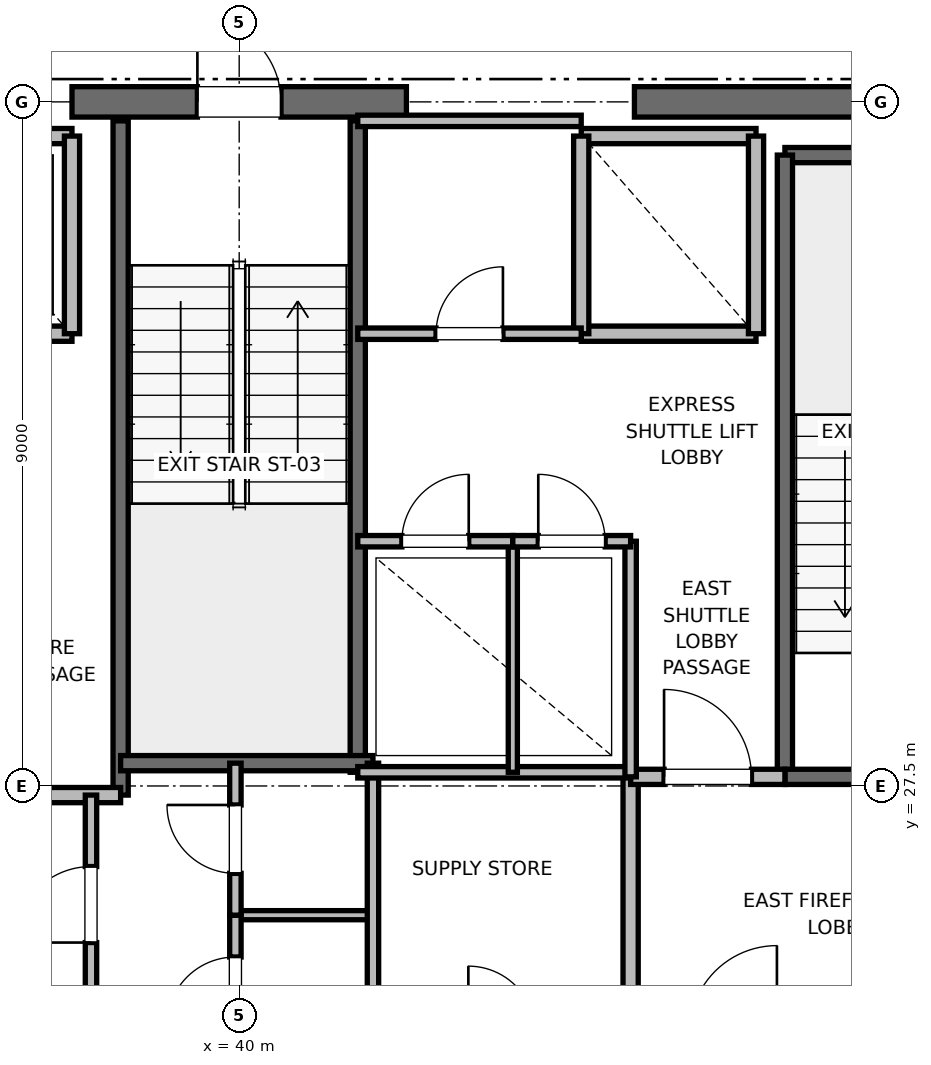
"""IFC4 building model, lengths in metres.
Left out: names, types, materials, properties, quantities, classifications, styles, units other than length and angle.
Written with IfcOpenShell. Run it as: python <this file> out.ifc"""

import sys

from ifc_helpers import new_model, si_unit, direction, frame, frame_2d, origin, place, context, subcontext, project, spatial, rectangle, extrude, element, fill, save


model = new_model("IFC4")
c1 = context("Model", 3, precision=1e-05, world=origin(), true_north=direction((0.0, 1.0)))
c2 = subcontext(c1, "Body", "Model", "MODEL_VIEW")
j1 = project(units=[si_unit("LENGTHUNIT", "METRE"), si_unit("PLANEANGLEUNIT", "RADIAN")], contexts=[c1])
p1 = place(None, origin())
s1 = spatial("IfcSite", under=j1, at=p1, CompositionType="ELEMENT")
p2 = place(p1, origin())
s2 = spatial("IfcBuilding", under=s1, at=p2, CompositionType="ELEMENT")
p3 = place(p2, frame((0.0, 0.0, 330.8)))
s3 = spatial("IfcBuildingStorey", under=s2, at=p3, CompositionType="ELEMENT", Elevation=330.8)
p4 = place(p3, frame((37.8, 36.5, 0.0), z_axis=(0.0, 0.0, 1.0), x_axis=(1.0, 0.0, 0.0)))
e1 = element("IfcWall", 1, at=p4, inside=s3, PredefinedType="SHEAR", context=c2, shape_type="SweptSolid", body=[
    extrude(rectangle(XDim=4.4, YDim=0.4, at=frame_2d((2.2, 0.0))), origin(), (0.0, 0.0, 1.0), 3.785),
])
p5 = place(p4, frame((1.65, 0.0, 0.0)))
e2 = element("IfcOpeningElement", 2, at=p5, cuts=e1, PredefinedType="OPENING", context=c2, shape_type="SweptSolid", body=[
    extrude(rectangle(XDim=1.1, YDim=2.15, at=frame_2d((0.55, 1.075))), frame((0.0, 0.2, 0.0), z_axis=(0.0, -1.0, 0.0), x_axis=(1.0, 0.0, 0.0)), (0.0, 0.0, 1.0), 0.4),
])
p6 = place(p3, frame((45.2, 36.5, 0.0), z_axis=(0.0, 0.0, 1.0), x_axis=(1.0, 0.0, 0.0)))
e3 = element("IfcWall", 3, at=p6, inside=s3, PredefinedType="SHEAR", context=c2, shape_type="SweptSolid", body=[
    extrude(rectangle(XDim=5.8, YDim=0.4, at=frame_2d((2.9, 0.0))), origin(), (0.0, 0.0, 1.0), 3.785),
])
p7 = place(p3, frame((47.18, 35.8, 0.0), z_axis=(0.0, 0.0, 1.0), x_axis=(1.0, 0.0, 0.0)))
e4 = element("IfcWall", 4, at=p7, inside=s3, PredefinedType="SOLIDWALL", context=c2, shape_type="SweptSolid", body=[
    extrude(rectangle(XDim=3.12, YDim=0.2, at=frame_2d((1.56, 0.0))), origin(), (0.0, 0.0, 1.0), 3.785),
])
p8 = place(p3, frame((47.18, 27.62, 0.0), z_axis=(0.0, 0.0, 1.0), x_axis=(0.0, 1.0, 0.0)))
e5 = element("IfcWall", 5, at=p8, inside=s3, PredefinedType="SOLIDWALL", context=c2, shape_type="SweptSolid", body=[
    extrude(rectangle(XDim=8.18, YDim=0.2, at=frame_2d((4.09, 0.0))), origin(), (0.0, 0.0, 1.0), 3.785),
])
p9 = place(p3, frame((47.18, 27.62, 0.0), z_axis=(0.0, 0.0, 1.0), x_axis=(1.0, 0.0, 0.0)))
e6 = element("IfcWall", 6, at=p9, inside=s3, PredefinedType="SOLIDWALL", context=c2, shape_type="SweptSolid", body=[
    extrude(rectangle(XDim=3.12, YDim=0.2, at=frame_2d((1.56, 0.0))), origin(), (0.0, 0.0, 1.0), 3.785),
])
p10 = place(p9, frame((1.01, 0.0, 0.0)))
e7 = element("IfcOpeningElement", 7, at=p10, cuts=e6, PredefinedType="OPENING", context=c2, shape_type="SweptSolid", body=[
    extrude(rectangle(XDim=1.1, YDim=2.15, at=frame_2d((0.55, 1.075))), frame((0.0, 0.1, 0.0), z_axis=(0.0, -1.0, 0.0), x_axis=(1.0, 0.0, 0.0)), (0.0, 0.0, 1.0), 0.2),
])
p11 = place(p3, frame((38.44, 27.38, 0.0), z_axis=(0.0, 0.0, 1.0), x_axis=(0.0, 1.0, 0.0)))
e8 = element("IfcWall", 8, at=p11, inside=s3, PredefinedType="SOLIDWALL", context=c2, shape_type="SweptSolid", body=[
    extrude(rectangle(XDim=8.87, YDim=0.2, at=frame_2d((4.435, 0.0))), origin(), (0.0, 0.0, 1.0), 3.785),
])
p12 = place(p3, frame((41.56, 27.68, 0.0), z_axis=(0.0, 0.0, 1.0), x_axis=(0.0, 1.0, 0.0)))
e9 = element("IfcWall", 9, at=p12, inside=s3, PredefinedType="SOLIDWALL", context=c2, shape_type="SweptSolid", body=[
    extrude(rectangle(XDim=8.57, YDim=0.2, at=frame_2d((4.285, 0.0))), origin(), (0.0, 0.0, 1.0), 3.785),
])
p13 = place(p3, frame((38.44, 27.8, 0.0), z_axis=(0.0, 0.0, 1.0), x_axis=(1.0, 0.0, 0.0)))
e10 = element("IfcWall", 10, at=p13, inside=s3, PredefinedType="SOLIDWALL", context=c2, shape_type="SweptSolid", body=[
    extrude(rectangle(XDim=3.32, YDim=0.2, at=frame_2d((1.66, 0.0))), origin(), (0.0, 0.0, 1.0), 3.785),
])
p14 = place(p3, frame((32.82, 27.38, 0.0), z_axis=(0.0, 0.0, 1.0), x_axis=(1.0, 0.0, 0.0)))
e11 = element("IfcWall", 11, at=p14, inside=s3, PredefinedType="PARTITIONING", context=c2, shape_type="SweptSolid", body=[
    extrude(rectangle(XDim=5.62, YDim=0.2, at=frame_2d((2.81, 0.0))), origin(), (0.0, 0.0, 1.0), 3.785),
])
p15 = place(p3, frame((45.15, 24.25, 0.0), z_axis=(0.0, 0.0, 1.0), x_axis=(0.0, 1.0, 0.0)))
e12 = element("IfcWall", 12, at=p15, inside=s3, PredefinedType="PARTITIONING", context=c2, shape_type="SweptSolid", body=[
    extrude(rectangle(XDim=3.37, YDim=0.2, at=frame_2d((1.685, 0.0))), origin(), (0.0, 0.0, 1.0), 3.785),
])
p16 = place(p3, frame((45.15, 27.62, 0.0), z_axis=(0.0, 0.0, 1.0), x_axis=(1.0, 0.0, 0.0)))
e13 = element("IfcWall", 13, at=p16, inside=s3, PredefinedType="PARTITIONING", context=c2, shape_type="SweptSolid", body=[
    extrude(rectangle(XDim=2.03, YDim=0.2, at=frame_2d((1.015, 0.0))), origin(), (0.0, 0.0, 1.0), 3.785),
])
p17 = place(p16, frame((0.44, 0.0, 0.0)))
e14 = element("IfcOpeningElement", 14, at=p17, cuts=e13, PredefinedType="OPENING", context=c2, shape_type="SweptSolid", body=[
    extrude(rectangle(XDim=1.15, YDim=2.2, at=frame_2d((0.575, 1.1))), frame((0.0, 0.1, 0.0), z_axis=(0.0, -1.0, 0.0), x_axis=(1.0, 0.0, 0.0)), (0.0, 0.0, 1.0), 0.2),
])
p18 = place(p3, frame((35.5, 33.45, 0.0), z_axis=(0.0, 0.0, 1.0), x_axis=(1.0, 0.0, 0.0)))
e15 = element("IfcWall", 15, at=p18, inside=s3, PredefinedType="SOLIDWALL", context=c2, shape_type="SweptSolid", body=[
    extrude(rectangle(XDim=2.3, YDim=0.2, at=frame_2d((1.15, 0.0))), origin(), (0.0, 0.0, 1.0), 3.785),
])
p19 = place(p18, frame((0.6, 0.0, 0.0)))
e16 = element("IfcOpeningElement", 16, at=p19, cuts=e15, PredefinedType="OPENING", context=c2, shape_type="SweptSolid", body=[
    extrude(rectangle(XDim=1.1, YDim=2.2, at=frame_2d((0.55, 1.1))), frame((0.0, 0.1, 0.0), z_axis=(0.0, -1.0, 0.0), x_axis=(1.0, 0.0, 0.0)), (0.0, 0.0, 1.0), 0.2),
])
p20 = place(p3, frame((37.8, 36.05, 0.0), z_axis=(0.0, 0.0, 1.0), x_axis=(-1.0, 0.0, 0.0)))
e17 = element("IfcWall", 17, at=p20, inside=s3, PredefinedType="SOLIDWALL", context=c2, shape_type="SweptSolid", body=[
    extrude(rectangle(XDim=2.3, YDim=0.2, at=frame_2d((1.15, 0.0))), origin(), (0.0, 0.0, 1.0), 2.865),
])
p21 = place(p3, frame((37.8, 33.45, 0.0), z_axis=(0.0, 0.0, 1.0), x_axis=(0.0, 1.0, 0.0)))
e18 = element("IfcWall", 18, at=p21, inside=s3, PredefinedType="SOLIDWALL", context=c2, shape_type="SweptSolid", body=[
    extrude(rectangle(XDim=2.6, YDim=0.2, at=frame_2d((1.3, 0.0))), origin(), (0.0, 0.0, 1.0), 2.865),
])
p22 = place(p3, frame((44.5, 33.45, 0.0), z_axis=(0.0, 0.0, 1.0), x_axis=(1.0, 0.0, 0.0)))
e19 = element("IfcWall", 19, at=p22, inside=s3, PredefinedType="SOLIDWALL", context=c2, shape_type="SweptSolid", body=[
    extrude(rectangle(XDim=2.3, YDim=0.2, at=frame_2d((1.15, 0.0))), origin(), (0.0, 0.0, 1.0), 3.785),
])
p23 = place(p3, frame((46.8, 36.05, 0.0), z_axis=(0.0, 0.0, 1.0), x_axis=(-1.0, 0.0, 0.0)))
e20 = element("IfcWall", 20, at=p23, inside=s3, PredefinedType="SOLIDWALL", context=c2, shape_type="SweptSolid", body=[
    extrude(rectangle(XDim=2.3, YDim=0.2, at=frame_2d((1.15, 0.0))), origin(), (0.0, 0.0, 1.0), 2.865),
])
p24 = place(p3, frame((44.5, 36.05, 0.0), z_axis=(0.0, 0.0, 1.0), x_axis=(0.0, -1.0, 0.0)))
e21 = element("IfcWall", 21, at=p24, inside=s3, PredefinedType="SOLIDWALL", context=c2, shape_type="SweptSolid", body=[
    extrude(rectangle(XDim=2.6, YDim=0.2, at=frame_2d((1.3, 0.0))), origin(), (0.0, 0.0, 1.0), 2.865),
])
p25 = place(p3, frame((46.8, 33.45, 0.0), z_axis=(0.0, 0.0, 1.0), x_axis=(0.0, 1.0, 0.0)))
e22 = element("IfcWall", 22, at=p25, inside=s3, PredefinedType="SOLIDWALL", context=c2, shape_type="SweptSolid", body=[
    extrude(rectangle(XDim=2.6, YDim=0.2, at=frame_2d((1.3, 0.0))), origin(), (0.0, 0.0, 1.0), 3.785),
])
p26 = place(p3, frame((39.95, 25.8, 0.0), z_axis=(0.0, 0.0, 1.0), x_axis=(1.0, 0.0, 0.0)))
e23 = element("IfcWall", 23, at=p26, inside=s3, PredefinedType="PARTITIONING", context=c2, shape_type="SweptSolid", body=[
    extrude(rectangle(XDim=1.81, YDim=0.12, at=frame_2d((0.905, 0.0))), origin(), (0.0, 0.0, 1.0), 2.85),
])
p27 = place(p3, frame((41.76, 23.8, 0.0), z_axis=(0.0, 0.0, 1.0), x_axis=(0.0, 1.0, 0.0)))
e24 = element("IfcWall", 24, at=p27, inside=s3, PredefinedType="PARTITIONING", context=c2, shape_type="SweptSolid", body=[
    extrude(rectangle(XDim=4.0, YDim=0.15, at=frame_2d((2.0, 0.0))), origin(), (0.0, 0.0, 1.0), 2.85),
])
p28 = place(p3, frame((39.95, 23.8, 0.0), z_axis=(0.0, 0.0, 1.0), x_axis=(0.0, 1.0, 0.0)))
e25 = element("IfcWall", 25, at=p28, inside=s3, PredefinedType="PARTITIONING", context=c2, shape_type="SweptSolid", body=[
    extrude(rectangle(XDim=2.0, YDim=0.15, at=frame_2d((1.0, 0.0))), origin(), (0.0, 0.0, 1.0), 2.85),
])
p29 = place(p28, frame((0.55, 0.0, 0.0)))
e26 = element("IfcOpeningElement", 26, at=p29, cuts=e25, PredefinedType="OPENING", context=c2, shape_type="SweptSolid", body=[
    extrude(rectangle(XDim=0.9, YDim=2.1, at=frame_2d((0.45, 1.05))), frame((0.0, 0.075, 0.0), z_axis=(0.0, -1.0, 0.0), x_axis=(1.0, 0.0, 0.0)), (0.0, 0.0, 1.0), 0.15),
])
p30 = place(p3, frame((39.95, 25.8, 0.0), z_axis=(0.0, 0.0, 1.0), x_axis=(0.0, 1.0, 0.0)))
e27 = element("IfcWall", 27, at=p30, inside=s3, PredefinedType="PARTITIONING", context=c2, shape_type="SweptSolid", body=[
    extrude(rectangle(XDim=2.0, YDim=0.15, at=frame_2d((1.0, 0.0))), origin(), (0.0, 0.0, 1.0), 2.85),
])
p31 = place(p30, frame((0.55, 0.0, 0.0)))
e28 = element("IfcOpeningElement", 28, at=p31, cuts=e27, PredefinedType="OPENING", context=c2, shape_type="SweptSolid", body=[
    extrude(rectangle(XDim=0.9, YDim=2.1, at=frame_2d((0.45, 1.05))), frame((0.0, 0.075, 0.0), z_axis=(0.0, -1.0, 0.0), x_axis=(1.0, 0.0, 0.0)), (0.0, 0.0, 1.0), 0.15),
])
p32 = place(p3, frame((38.05, 24.5, 0.0), z_axis=(0.0, 0.0, 1.0), x_axis=(0.0, 1.0, 0.0)))
e29 = element("IfcWall", 29, at=p32, inside=s3, PredefinedType="PARTITIONING", context=c2, shape_type="SweptSolid", body=[
    extrude(rectangle(XDim=2.88, YDim=0.15, at=frame_2d((1.44, 0.0))), origin(), (0.0, 0.0, 1.0), 2.85),
])
p33 = place(p32, frame((0.94, 0.0, 0.0)))
e30 = element("IfcOpeningElement", 30, at=p33, cuts=e29, PredefinedType="OPENING", context=c2, shape_type="SweptSolid", body=[
    extrude(rectangle(XDim=1.0, YDim=2.15, at=frame_2d((0.5, 1.075))), frame((0.0, 0.075, 0.0), z_axis=(0.0, -1.0, 0.0), x_axis=(1.0, 0.0, 0.0)), (0.0, 0.0, 1.0), 0.15),
])
p34 = place(p3, frame((41.56, 27.68, 0.0), z_axis=(0.0, 0.0, 1.0), x_axis=(1.0, 0.0, 0.0)))
e31 = element("IfcWall", 31, at=p34, inside=s3, PredefinedType="PARTITIONING", context=c2, shape_type="SweptSolid", body=[
    extrude(rectangle(XDim=3.59, YDim=0.15, at=frame_2d((1.795, 0.0))), origin(), (0.0, 0.0, 1.0), 2.85),
])
p35 = place(p3, frame((45.15, 27.62, 0.0), z_axis=(0.0, 0.0, 1.0), x_axis=(0.0, 1.0, 0.0)))
e32 = element("IfcWall", 32, at=p35, inside=s3, PredefinedType="PARTITIONING", context=c2, shape_type="SweptSolid", body=[
    extrude(rectangle(XDim=3.1, YDim=0.15, at=frame_2d((1.55, 0.0))), origin(), (0.0, 0.0, 1.0), 2.85),
])
p36 = place(p3, frame((43.6, 27.68, 0.0), z_axis=(0.0, 0.0, 1.0), x_axis=(0.0, 1.0, 0.0)))
e33 = element("IfcWall", 33, at=p36, inside=s3, PredefinedType="PARTITIONING", context=c2, shape_type="SweptSolid", body=[
    extrude(rectangle(XDim=3.04, YDim=0.12, at=frame_2d((1.52, 0.0))), origin(), (0.0, 0.0, 1.0), 2.85),
])
p37 = place(p3, frame((41.56, 30.72, 0.0), z_axis=(0.0, 0.0, 1.0), x_axis=(1.0, 0.0, 0.0)))
e34 = element("IfcWall", 34, at=p37, inside=s3, PredefinedType="PARTITIONING", context=c2, shape_type="SweptSolid", body=[
    extrude(rectangle(XDim=2.04, YDim=0.15, at=frame_2d((1.02, 0.0))), origin(), (0.0, 0.0, 1.0), 2.85),
])
p38 = place(p37, frame((0.58, 0.0, 0.0)))
e35 = element("IfcOpeningElement", 35, at=p38, cuts=e34, PredefinedType="OPENING", context=c2, shape_type="SweptSolid", body=[
    extrude(rectangle(XDim=0.88, YDim=2.1, at=frame_2d((0.44, 1.05))), frame((0.0, 0.075, 0.0), z_axis=(0.0, -1.0, 0.0), x_axis=(1.0, 0.0, 0.0)), (0.0, 0.0, 1.0), 0.15),
])
p39 = place(p3, frame((43.6, 30.72, 0.0), z_axis=(0.0, 0.0, 1.0), x_axis=(1.0, 0.0, 0.0)))
e36 = element("IfcWall", 36, at=p39, inside=s3, PredefinedType="PARTITIONING", context=c2, shape_type="SweptSolid", body=[
    extrude(rectangle(XDim=1.55, YDim=0.15, at=frame_2d((0.775, 0.0))), origin(), (0.0, 0.0, 1.0), 2.85),
])
p40 = place(p39, frame((0.335, 0.0, 0.0)))
e37 = element("IfcOpeningElement", 37, at=p40, cuts=e36, PredefinedType="OPENING", context=c2, shape_type="SweptSolid", body=[
    extrude(rectangle(XDim=0.88, YDim=2.1, at=frame_2d((0.44, 1.05))), frame((0.0, 0.075, 0.0), z_axis=(0.0, -1.0, 0.0), x_axis=(1.0, 0.0, 0.0)), (0.0, 0.0, 1.0), 0.15),
])
p41 = place(p3, frame((41.56, 36.25, 0.0), z_axis=(0.0, 0.0, 1.0), x_axis=(1.0, 0.0, 0.0)))
e38 = element("IfcWall", 38, at=p41, inside=s3, PredefinedType="PARTITIONING", context=c2, shape_type="SweptSolid", body=[
    extrude(rectangle(XDim=2.94, YDim=0.15, at=frame_2d((1.47, 0.0))), origin(), (0.0, 0.0, 1.0), 2.85),
])
p42 = place(p3, frame((41.56, 33.45, 0.0), z_axis=(0.0, 0.0, 1.0), x_axis=(1.0, 0.0, 0.0)))
e39 = element("IfcWall", 39, at=p42, inside=s3, PredefinedType="PARTITIONING", context=c2, shape_type="SweptSolid", body=[
    extrude(rectangle(XDim=2.94, YDim=0.15, at=frame_2d((1.47, 0.0))), origin(), (0.0, 0.0, 1.0), 2.85),
])
p43 = place(p42, frame((1.03, 0.0, 0.0)))
e40 = element("IfcOpeningElement", 40, at=p43, cuts=e39, PredefinedType="OPENING", context=c2, shape_type="SweptSolid", body=[
    extrude(rectangle(XDim=0.88, YDim=2.1, at=frame_2d((0.44, 1.05))), frame((0.0, 0.075, 0.0), z_axis=(0.0, -1.0, 0.0), x_axis=(1.0, 0.0, 0.0)), (0.0, 0.0, 1.0), 0.15),
])
p44 = place(p5, origin())
e41 = element("IfcDoor", 41, at=p44, inside=s3, OperationType="SINGLE_SWING_LEFT", PredefinedType="DOOR", context=c2, shape_type="SweptSolid", body=[
    extrude(rectangle(XDim=1.1, YDim=2.15, at=frame_2d((0.55, 1.075))), frame((0.0, 0.025, 0.0), z_axis=(0.0, -1.0, 0.0), x_axis=(1.0, 0.0, 0.0)), (0.0, 0.0, 1.0), 0.05),
])
fill(e2, e41)
p45 = place(p17, origin())
e42 = element("IfcDoor", 42, at=p45, inside=s3, OperationType="SINGLE_SWING_LEFT", PredefinedType="DOOR", context=c2, shape_type="SweptSolid", body=[
    extrude(rectangle(XDim=1.15, YDim=2.2, at=frame_2d((0.575, 1.1))), frame((0.0, 0.025, 0.0), z_axis=(0.0, -1.0, 0.0), x_axis=(1.0, 0.0, 0.0)), (0.0, 0.0, 1.0), 0.05),
])
fill(e14, e42)
p46 = place(p29, origin())
e43 = element("IfcDoor", 43, at=p46, inside=s3, OperationType="SINGLE_SWING_LEFT", PredefinedType="DOOR", context=c2, shape_type="SweptSolid", body=[
    extrude(rectangle(XDim=0.9, YDim=2.1, at=frame_2d((0.45, 1.05))), frame((0.0, 0.025, 0.0), z_axis=(0.0, -1.0, 0.0), x_axis=(1.0, 0.0, 0.0)), (0.0, 0.0, 1.0), 0.05),
])
fill(e26, e43)
p47 = place(p31, origin())
e44 = element("IfcDoor", 44, at=p47, inside=s3, OperationType="SINGLE_SWING_RIGHT", PredefinedType="DOOR", context=c2, shape_type="SweptSolid", body=[
    extrude(rectangle(XDim=0.9, YDim=2.1, at=frame_2d((0.45, 1.05))), frame((0.0, 0.025, 0.0), z_axis=(0.0, -1.0, 0.0), x_axis=(1.0, 0.0, 0.0)), (0.0, 0.0, 1.0), 0.05),
])
fill(e28, e44)
p48 = place(p33, origin())
e45 = element("IfcDoor", 45, at=p48, inside=s3, OperationType="SINGLE_SWING_LEFT", PredefinedType="DOOR", context=c2, shape_type="SweptSolid", body=[
    extrude(rectangle(XDim=1.0, YDim=2.15, at=frame_2d((0.5, 1.075))), frame((0.0, 0.025, 0.0), z_axis=(0.0, -1.0, 0.0), x_axis=(1.0, 0.0, 0.0)), (0.0, 0.0, 1.0), 0.05),
])
fill(e30, e45)
p49 = place(p38, origin())
e46 = element("IfcDoor", 46, at=p49, inside=s3, OperationType="SINGLE_SWING_RIGHT", PredefinedType="DOOR", context=c2, shape_type="SweptSolid", body=[
    extrude(rectangle(XDim=0.88, YDim=2.1, at=frame_2d((0.44, 1.05))), frame((0.0, 0.025, 0.0), z_axis=(0.0, -1.0, 0.0), x_axis=(1.0, 0.0, 0.0)), (0.0, 0.0, 1.0), 0.05),
])
fill(e35, e46)
p50 = place(p40, origin())
e47 = element("IfcDoor", 47, at=p50, inside=s3, OperationType="SINGLE_SWING_LEFT", PredefinedType="DOOR", context=c2, shape_type="SweptSolid", body=[
    extrude(rectangle(XDim=0.88, YDim=2.1, at=frame_2d((0.44, 1.05))), frame((0.0, 0.025, 0.0), z_axis=(0.0, -1.0, 0.0), x_axis=(1.0, 0.0, 0.0)), (0.0, 0.0, 1.0), 0.05),
])
fill(e37, e47)
p51 = place(p43, origin())
e48 = element("IfcDoor", 48, at=p51, inside=s3, OperationType="SINGLE_SWING_RIGHT", PredefinedType="DOOR", context=c2, shape_type="SweptSolid", body=[
    extrude(rectangle(XDim=0.88, YDim=2.1, at=frame_2d((0.44, 1.05))), frame((0.0, 0.025, 0.0), z_axis=(0.0, -1.0, 0.0), x_axis=(1.0, 0.0, 0.0)), (0.0, 0.0, 1.0), 0.05),
])
fill(e40, e48)
save(model, sys.argv[1])
